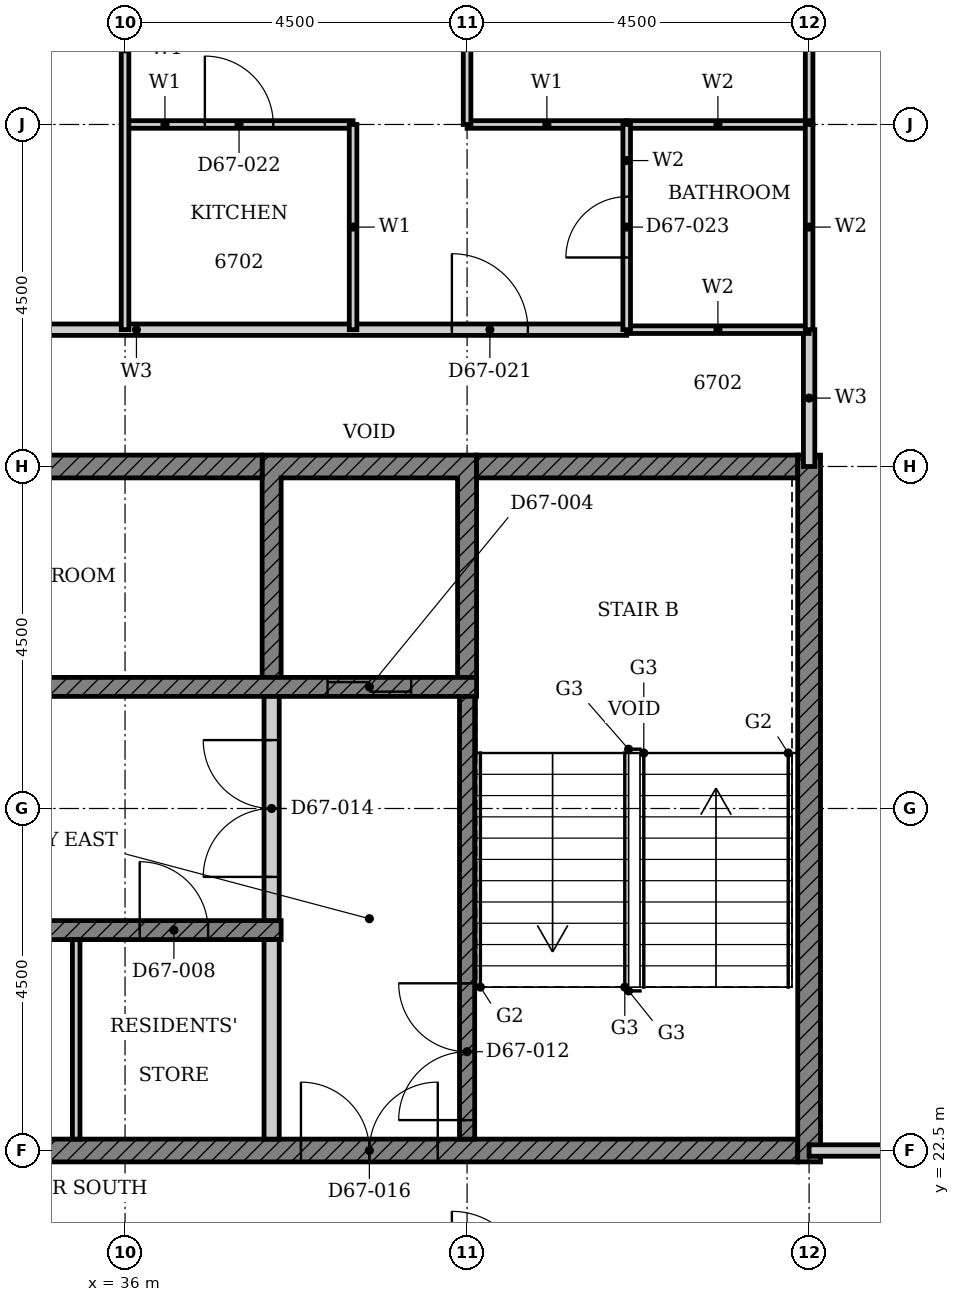
"""IFC4 building model, lengths in metres.
Left out: names, types, materials, properties, quantities, classifications, styles, units other than length and angle.
Written with IfcOpenShell. Run it as: python <this file> out.ifc"""

import sys

from ifc_helpers import new_model, si_unit, direction, frame, frame_2d, origin, place, context, subcontext, project, spatial, polyline, rectangle, outline, extrude, element, fill, save


model = new_model("IFC4")
c1 = context("Model", 3, precision=1e-05, world=origin(), true_north=direction((0.0, 1.0)))
c2 = subcontext(c1, "Body", "Model", "MODEL_VIEW")
j1 = project(units=[si_unit("LENGTHUNIT", "METRE"), si_unit("PLANEANGLEUNIT", "RADIAN")], contexts=[c1])
p1 = place(None, origin())
s1 = spatial("IfcSite", under=j1, at=p1, CompositionType="ELEMENT")
p2 = place(p1, origin())
s2 = spatial("IfcBuilding", under=s1, at=p2, CompositionType="ELEMENT")
p3 = place(p2, frame((0.0, 0.0, 263.8)))
s3 = spatial("IfcBuildingStorey", under=s2, at=p3, CompositionType="ELEMENT", Elevation=263.8)
p4 = place(p3, origin())
e1 = element("IfcWall", 1, at=p4, inside=s3, PredefinedType="SHEAR", context=c2, shape_type="SweptSolid", body=[
    extrude(outline(polyline([(37.803, 28.725), (38.053, 28.725), (38.053, 31.35), (40.375, 31.35), (40.375, 28.725), (40.625, 28.725), (40.625, 31.65), (37.803, 31.65), (37.803, 28.725)])), origin(), (0.0, 0.0, 1.0), 3.4),
])
p5 = place(p3, frame((30.339, 22.5, 0.0), z_axis=(0.0, 0.0, 1.0), x_axis=(1.0, 0.0, 0.0)))
e2 = element("IfcWall", 2, at=p5, inside=s3, PredefinedType="SHEAR", context=c2, shape_type="SweptSolid", body=[
    extrude(rectangle(XDim=14.511, YDim=0.3, at=frame_2d((7.255, 0.0))), origin(), (0.0, 0.0, 1.0), 3.4),
])
p6 = place(p5, frame((7.975, 0.0, 0.0)))
e3 = element("IfcOpeningElement", 3, at=p6, cuts=e2, PredefinedType="OPENING", context=c2, shape_type="SweptSolid", body=[
    extrude(rectangle(XDim=1.8, YDim=2.1, at=frame_2d((0.9, 1.05))), frame((0.0, 0.16, 0.0), z_axis=(0.0, -1.0, 0.0), x_axis=(1.0, 0.0, 0.0)), (0.0, 0.0, 1.0), 0.32),
])
p7 = place(p3, frame((30.339, 31.5, 0.0), z_axis=(0.0, 0.0, 1.0), x_axis=(1.0, 0.0, 0.0)))
e4 = element("IfcWall", 4, at=p7, inside=s3, PredefinedType="SHEAR", context=c2, shape_type="SweptSolid", body=[
    extrude(rectangle(XDim=7.464, YDim=0.3, at=frame_2d((3.732, 0.0))), origin(), (0.0, 0.0, 1.0), 3.4),
])
p8 = place(p3, frame((40.625, 31.5, 0.0), z_axis=(0.0, 0.0, 1.0), x_axis=(1.0, 0.0, 0.0)))
e5 = element("IfcWall", 5, at=p8, inside=s3, PredefinedType="SHEAR", context=c2, shape_type="SweptSolid", body=[
    extrude(rectangle(XDim=4.225, YDim=0.3, at=frame_2d((2.113, 0.0))), origin(), (0.0, 0.0, 1.0), 3.4),
])
p9 = place(p3, frame((45.0, 22.35, 0.0), z_axis=(0.0, 0.0, 1.0), x_axis=(0.0, 1.0, 0.0)))
e6 = element("IfcWall", 6, at=p9, inside=s3, PredefinedType="SHEAR", context=c2, shape_type="SweptSolid", body=[
    extrude(rectangle(XDim=9.3, YDim=0.3, at=frame_2d((4.65, 0.0))), origin(), (0.0, 0.0, 1.0), 3.4),
])
p10 = place(p3, frame((22.375, 25.4, 0.0), z_axis=(0.0, 0.0, 1.0), x_axis=(1.0, 0.0, 0.0)))
e7 = element("IfcWall", 7, at=p10, inside=s3, PredefinedType="SHEAR", context=c2, shape_type="SweptSolid", body=[
    extrude(rectangle(XDim=15.678, YDim=0.25, at=frame_2d((7.839, 0.0))), origin(), (0.0, 0.0, 1.0), 3.4),
])
p11 = place(p10, frame((6.004, 0.0, 0.0)))
e8 = element("IfcOpeningElement", 8, at=p11, cuts=e7, PredefinedType="OPENING", context=c2, shape_type="SweptSolid", body=[
    extrude(rectangle(XDim=1.1, YDim=2.1, at=frame_2d((0.55, 1.05))), frame((0.0, 0.135, 0.0), z_axis=(0.0, -1.0, 0.0), x_axis=(1.0, 0.0, 0.0)), (0.0, 0.0, 1.0), 0.27),
])
p12 = place(p10, frame((0.861, 0.0, 0.0)))
e9 = element("IfcOpeningElement", 9, at=p12, cuts=e7, PredefinedType="OPENING", context=c2, shape_type="SweptSolid", body=[
    extrude(rectangle(XDim=1.1, YDim=2.1, at=frame_2d((0.55, 1.05))), frame((0.0, 0.135, 0.0), z_axis=(0.0, -1.0, 0.0), x_axis=(1.0, 0.0, 0.0)), (0.0, 0.0, 1.0), 0.27),
])
p13 = place(p10, frame((3.532, 0.0, 0.0)))
e10 = element("IfcOpeningElement", 10, at=p13, cuts=e7, PredefinedType="OPENING", context=c2, shape_type="SweptSolid", body=[
    extrude(rectangle(XDim=0.9, YDim=2.1, at=frame_2d((0.45, 1.05))), frame((0.0, 0.135, 0.0), z_axis=(0.0, -1.0, 0.0), x_axis=(1.0, 0.0, 0.0)), (0.0, 0.0, 1.0), 0.27),
])
p14 = place(p10, frame((8.675, 0.0, 0.0)))
e11 = element("IfcOpeningElement", 11, at=p14, cuts=e7, PredefinedType="OPENING", context=c2, shape_type="SweptSolid", body=[
    extrude(rectangle(XDim=0.9, YDim=2.1, at=frame_2d((0.45, 1.05))), frame((0.0, 0.135, 0.0), z_axis=(0.0, -1.0, 0.0), x_axis=(1.0, 0.0, 0.0)), (0.0, 0.0, 1.0), 0.27),
])
p15 = place(p10, frame((11.246, 0.0, 0.0)))
e12 = element("IfcOpeningElement", 12, at=p15, cuts=e7, PredefinedType="OPENING", context=c2, shape_type="SweptSolid", body=[
    extrude(rectangle(XDim=0.9, YDim=2.1, at=frame_2d((0.45, 1.05))), frame((0.0, 0.135, 0.0), z_axis=(0.0, -1.0, 0.0), x_axis=(1.0, 0.0, 0.0)), (0.0, 0.0, 1.0), 0.27),
])
p16 = place(p10, frame((13.818, 0.0, 0.0)))
e13 = element("IfcOpeningElement", 13, at=p16, cuts=e7, PredefinedType="OPENING", context=c2, shape_type="SweptSolid", body=[
    extrude(rectangle(XDim=0.9, YDim=2.1, at=frame_2d((0.45, 1.05))), frame((0.0, 0.135, 0.0), z_axis=(0.0, -1.0, 0.0), x_axis=(1.0, 0.0, 0.0)), (0.0, 0.0, 1.0), 0.27),
])
p17 = place(p3, frame((24.947, 28.6, 0.0), z_axis=(0.0, 0.0, 1.0), x_axis=(1.0, 0.0, 0.0)))
e14 = element("IfcWall", 14, at=p17, inside=s3, PredefinedType="SHEAR", context=c2, shape_type="SweptSolid", body=[
    extrude(rectangle(XDim=15.678, YDim=0.25, at=frame_2d((7.839, 0.0))), origin(), (0.0, 0.0, 1.0), 3.4),
])
p18 = place(p17, frame((3.432, 0.0, 0.0)))
e15 = element("IfcOpeningElement", 15, at=p18, cuts=e14, PredefinedType="OPENING", context=c2, shape_type="SweptSolid", body=[
    extrude(rectangle(XDim=1.1, YDim=2.1, at=frame_2d((0.55, 1.05))), frame((0.0, 0.135, 0.0), z_axis=(0.0, -1.0, 0.0), x_axis=(1.0, 0.0, 0.0)), (0.0, 0.0, 1.0), 0.27),
])
p19 = place(p17, frame((13.718, 0.0, 0.0)))
e16 = element("IfcOpeningElement", 16, at=p19, cuts=e14, PredefinedType="OPENING", context=c2, shape_type="SweptSolid", body=[
    extrude(rectangle(XDim=1.1, YDim=2.1, at=frame_2d((0.55, 1.05))), frame((0.0, 0.135, 0.0), z_axis=(0.0, -1.0, 0.0), x_axis=(1.0, 0.0, 0.0)), (0.0, 0.0, 1.0), 0.27),
])
p20 = place(p17, frame((0.961, 0.0, 0.0)))
e17 = element("IfcOpeningElement", 17, at=p20, cuts=e14, PredefinedType="OPENING", context=c2, shape_type="SweptSolid", body=[
    extrude(rectangle(XDim=0.9, YDim=2.1, at=frame_2d((0.45, 1.05))), frame((0.0, 0.135, 0.0), z_axis=(0.0, -1.0, 0.0), x_axis=(1.0, 0.0, 0.0)), (0.0, 0.0, 1.0), 0.27),
])
p21 = place(p17, frame((8.675, 0.0, 0.0)))
e18 = element("IfcOpeningElement", 18, at=p21, cuts=e14, PredefinedType="OPENING", context=c2, shape_type="SweptSolid", body=[
    extrude(rectangle(XDim=0.9, YDim=2.1, at=frame_2d((0.45, 1.05))), frame((0.0, 0.135, 0.0), z_axis=(0.0, -1.0, 0.0), x_axis=(1.0, 0.0, 0.0)), (0.0, 0.0, 1.0), 0.27),
])
p22 = place(p3, frame((37.928, 22.65, 0.0), z_axis=(0.0, 0.0, 1.0), x_axis=(0.0, 1.0, 0.0)))
e19 = element("IfcWall", 19, at=p22, inside=s3, PredefinedType="PARTITIONING", context=c2, shape_type="SweptSolid", body=[
    extrude(rectangle(XDim=2.625, YDim=0.2, at=frame_2d((1.312, 0.0))), origin(), (0.0, 0.0, 1.0), 3.4),
])
p23 = place(p3, frame((35.357, 22.65, 0.0), z_axis=(0.0, 0.0, 1.0), x_axis=(0.0, 1.0, 0.0)))
e20 = element("IfcWall", 20, at=p23, inside=s3, PredefinedType="PARTITIONING", context=c2, shape_type="SweptSolid", body=[
    extrude(rectangle(XDim=2.625, YDim=0.1, at=frame_2d((1.312, 0.0))), origin(), (0.0, 0.0, 1.0), 3.4),
])
p24 = place(p3, frame((40.5, 22.65, 0.0), z_axis=(0.0, 0.0, 1.0), x_axis=(0.0, 1.0, 0.0)))
e21 = element("IfcWall", 21, at=p24, inside=s3, PredefinedType="SHEAR", context=c2, shape_type="SweptSolid", body=[
    extrude(rectangle(XDim=5.825, YDim=0.2, at=frame_2d((2.913, 0.0))), origin(), (0.0, 0.0, 1.0), 3.4),
])
p25 = place(p24, frame((0.25, 0.0, 0.0)))
e22 = element("IfcOpeningElement", 22, at=p25, cuts=e21, PredefinedType="OPENING", context=c2, shape_type="SweptSolid", body=[
    extrude(rectangle(XDim=1.8, YDim=2.1, at=frame_2d((0.9, 1.05))), frame((0.0, 0.11, 0.0), z_axis=(0.0, -1.0, 0.0), x_axis=(1.0, 0.0, 0.0)), (0.0, 0.0, 1.0), 0.22),
])
p26 = place(p3, frame((37.928, 25.525, 0.0), z_axis=(0.0, 0.0, 1.0), x_axis=(0.0, 1.0, 0.0)))
e23 = element("IfcWall", 23, at=p26, inside=s3, PredefinedType="PARTITIONING", context=c2, shape_type="SweptSolid", body=[
    extrude(rectangle(XDim=2.95, YDim=0.2, at=frame_2d((1.475, 0.0))), origin(), (0.0, 0.0, 1.0), 3.4),
])
p27 = place(p26, frame((0.575, 0.0, 0.0)))
e24 = element("IfcOpeningElement", 24, at=p27, cuts=e23, PredefinedType="OPENING", context=c2, shape_type="SweptSolid", body=[
    extrude(rectangle(XDim=1.8, YDim=2.1, at=frame_2d((0.9, 1.05))), frame((0.0, 0.11, 0.0), z_axis=(0.0, -1.0, 0.0), x_axis=(1.0, 0.0, 0.0)), (0.0, 0.0, 1.0), 0.22),
])
p28 = place(p3, frame((45.0, 22.5, 0.0), z_axis=(0.0, 0.0, 1.0), x_axis=(1.0, 0.0, 0.0)))
e25 = element("IfcWall", 25, at=p28, inside=s3, PredefinedType="PARTITIONING", context=c2, shape_type="SweptSolid", body=[
    extrude(rectangle(XDim=4.74, YDim=0.15, at=frame_2d((2.37, 0.0))), origin(), (0.0, 0.0, 1.0), 3.4),
])
p29 = place(p28, frame((1.75, 0.0, 0.0)))
e26 = element("IfcOpeningElement", 26, at=p29, cuts=e25, PredefinedType="OPENING", context=c2, shape_type="SweptSolid", body=[
    extrude(rectangle(XDim=1.0, YDim=2.1, at=frame_2d((0.5, 1.05))), frame((0.0, 0.085, 0.0), z_axis=(0.0, -1.0, 0.0), x_axis=(1.0, 0.0, 0.0)), (0.0, 0.0, 1.0), 0.17),
])
p30 = place(p3, frame((20.4, 33.3, 0.0), z_axis=(0.0, 0.0, 1.0), x_axis=(1.0, 0.0, 0.0)))
e27 = element("IfcWall", 27, at=p30, inside=s3, PredefinedType="PARTITIONING", context=c2, shape_type="SweptSolid", body=[
    extrude(rectangle(XDim=22.2, YDim=0.15, at=frame_2d((11.1, 0.0))), origin(), (0.0, 0.0, 1.0), 3.4),
])
p31 = place(p30, frame((1.3, 0.0, 0.0)))
e28 = element("IfcOpeningElement", 28, at=p31, cuts=e27, PredefinedType="OPENING", context=c2, shape_type="SweptSolid", body=[
    extrude(rectangle(XDim=1.0, YDim=2.2, at=frame_2d((0.5, 1.1))), frame((0.0, 0.085, 0.0), z_axis=(0.0, -1.0, 0.0), x_axis=(1.0, 0.0, 0.0)), (0.0, 0.0, 1.0), 0.17),
])
p32 = place(p30, frame((10.6, 0.0, 0.0)))
e29 = element("IfcOpeningElement", 29, at=p32, cuts=e27, PredefinedType="OPENING", context=c2, shape_type="SweptSolid", body=[
    extrude(rectangle(XDim=1.0, YDim=2.1, at=frame_2d((0.5, 1.05))), frame((0.0, 0.085, 0.0), z_axis=(0.0, -1.0, 0.0), x_axis=(1.0, 0.0, 0.0)), (0.0, 0.0, 1.0), 0.17),
])
p33 = place(p30, frame((19.9, 0.0, 0.0)))
e30 = element("IfcOpeningElement", 30, at=p33, cuts=e27, PredefinedType="OPENING", context=c2, shape_type="SweptSolid", body=[
    extrude(rectangle(XDim=1.0, YDim=2.2, at=frame_2d((0.5, 1.1))), frame((0.0, 0.085, 0.0), z_axis=(0.0, -1.0, 0.0), x_axis=(1.0, 0.0, 0.0)), (0.0, 0.0, 1.0), 0.17),
])
p34 = place(p3, frame((45.0, 31.5, 0.0), z_axis=(0.0, 0.0, 1.0), x_axis=(0.0, 1.0, 0.0)))
e31 = element("IfcWall", 31, at=p34, inside=s3, PredefinedType="PARTITIONING", context=c2, shape_type="SweptSolid", body=[
    extrude(rectangle(XDim=1.8, YDim=0.15, at=frame_2d((0.9, 0.0))), origin(), (0.0, 0.0, 1.0), 3.4),
])
p35 = place(p3, frame((40.5, 36.0, 0.0), z_axis=(0.0, 0.0, 1.0), x_axis=(1.0, 0.0, 0.0)))
e32 = element("IfcWall", 32, at=p35, inside=s3, PredefinedType="PARTITIONING", context=c2, shape_type="SweptSolid", body=[
    extrude(rectangle(XDim=2.1, YDim=0.1, at=frame_2d((1.05, 0.0))), origin(), (0.0, 0.0, 1.0), 3.4),
])
p36 = place(p3, frame((36.0, 36.0, 0.0), z_axis=(0.0, 0.0, 1.0), x_axis=(1.0, 0.0, 0.0)))
e33 = element("IfcWall", 33, at=p36, inside=s3, PredefinedType="PARTITIONING", context=c2, shape_type="SweptSolid", body=[
    extrude(rectangle(XDim=3.0, YDim=0.1, at=frame_2d((1.5, 0.0))), origin(), (0.0, 0.0, 1.0), 3.4),
])
p37 = place(p36, frame((1.05, 0.0, 0.0)))
e34 = element("IfcOpeningElement", 34, at=p37, cuts=e33, PredefinedType="OPENING", context=c2, shape_type="SweptSolid", body=[
    extrude(rectangle(XDim=0.9, YDim=2.1, at=frame_2d((0.45, 1.05))), frame((0.0, 0.06, 0.0), z_axis=(0.0, -1.0, 0.0), x_axis=(1.0, 0.0, 0.0)), (0.0, 0.0, 1.0), 0.12),
])
p38 = place(p3, frame((36.0, 33.3, 0.0), z_axis=(0.0, 0.0, 1.0), x_axis=(0.0, 1.0, 0.0)))
e35 = element("IfcWall", 35, at=p38, inside=s3, PredefinedType="PARTITIONING", context=c2, shape_type="SweptSolid", body=[
    extrude(rectangle(XDim=7.39, YDim=0.1, at=frame_2d((3.695, 0.0))), origin(), (0.0, 0.0, 1.0), 3.4),
])
p39 = place(p3, frame((39.0, 33.3, 0.0), z_axis=(0.0, 0.0, 1.0), x_axis=(0.0, 1.0, 0.0)))
e36 = element("IfcWall", 36, at=p39, inside=s3, PredefinedType="PARTITIONING", context=c2, shape_type="SweptSolid", body=[
    extrude(rectangle(XDim=2.7, YDim=0.1, at=frame_2d((1.35, 0.0))), origin(), (0.0, 0.0, 1.0), 3.4),
])
p40 = place(p3, frame((40.5, 36.0, 0.0), z_axis=(0.0, 0.0, 1.0), x_axis=(0.0, 1.0, 0.0)))
e37 = element("IfcWall", 37, at=p40, inside=s3, PredefinedType="PARTITIONING", context=c2, shape_type="SweptSolid", body=[
    extrude(rectangle(XDim=4.74, YDim=0.1, at=frame_2d((2.37, 0.0))), origin(), (0.0, 0.0, 1.0), 3.4),
])
p41 = place(p40, frame((1.8, 0.0, 0.0)))
e38 = element("IfcOpeningElement", 38, at=p41, cuts=e37, PredefinedType="OPENING", context=c2, shape_type="SweptSolid", body=[
    extrude(rectangle(XDim=0.9, YDim=2.1, at=frame_2d((0.45, 1.05))), frame((0.0, 0.06, 0.0), z_axis=(0.0, -1.0, 0.0), x_axis=(1.0, 0.0, 0.0)), (0.0, 0.0, 1.0), 0.12),
])
p42 = place(p3, frame((45.0, 36.0, 0.0), z_axis=(0.0, 0.0, 1.0), x_axis=(0.0, 1.0, 0.0)))
e39 = element("IfcWall", 39, at=p42, inside=s3, PredefinedType="PARTITIONING", context=c2, shape_type="SweptSolid", body=[
    extrude(rectangle(XDim=2.2, YDim=0.1, at=frame_2d((1.1, 0.0))), origin(), (0.0, 0.0, 1.0), 3.4),
])
for number, where, z_axis, x_axis in (
    (40, (42.6, 33.3, 0.0), (0.0, 0.0, 1.0), (1.0, 0.0, 0.0)),
    (41, (42.6, 36.0, 0.0), (0.0, 0.0, 1.0), (1.0, 0.0, 0.0)),
):
    element("IfcWall", number, at=place(p3, frame(where, z_axis=z_axis, x_axis=x_axis)), inside=s3, PredefinedType="PARTITIONING", context=c2, shape_type="SweptSolid", body=[
        extrude(rectangle(XDim=2.4, YDim=0.1, at=frame_2d((1.2, 0.0))), origin(), (0.0, 0.0, 1.0), 3.4),
    ])
p43 = place(p3, frame((42.6, 33.3, 0.0), z_axis=(0.0, 0.0, 1.0), x_axis=(0.0, 1.0, 0.0)))
e42 = element("IfcWall", 42, at=p43, inside=s3, PredefinedType="PARTITIONING", context=c2, shape_type="SweptSolid", body=[
    extrude(rectangle(XDim=2.7, YDim=0.1, at=frame_2d((1.35, 0.0))), origin(), (0.0, 0.0, 1.0), 3.4),
])
p44 = place(p43, frame((0.95, 0.0, 0.0)))
e43 = element("IfcOpeningElement", 43, at=p44, cuts=e42, PredefinedType="OPENING", context=c2, shape_type="SweptSolid", body=[
    extrude(rectangle(XDim=0.8, YDim=2.1, at=frame_2d((0.4, 1.05))), frame((0.0, 0.06, 0.0), z_axis=(0.0, -1.0, 0.0), x_axis=(1.0, 0.0, 0.0)), (0.0, 0.0, 1.0), 0.12),
])
p45 = place(p3, frame((45.0, 33.3, 0.0), z_axis=(0.0, 0.0, 1.0), x_axis=(0.0, 1.0, 0.0)))
e44 = element("IfcWall", 44, at=p45, inside=s3, PredefinedType="PARTITIONING", context=c2, shape_type="SweptSolid", body=[
    extrude(rectangle(XDim=2.7, YDim=0.1, at=frame_2d((1.35, 0.0))), origin(), (0.0, 0.0, 1.0), 3.4),
])
p46 = place(p19, origin())
e45 = element("IfcDoor", 45, at=p46, inside=s3, OperationType="DOUBLE_DOOR_SLIDING", PredefinedType="DOOR", context=c2, shape_type="SweptSolid", body=[
    extrude(rectangle(XDim=1.1, YDim=2.1, at=frame_2d((0.55, 1.05))), frame((0.0, 0.025, 0.0), z_axis=(0.0, -1.0, 0.0), x_axis=(1.0, 0.0, 0.0)), (0.0, 0.0, 1.0), 0.05),
])
fill(e16, e45)
p47 = place(p16, origin())
e46 = element("IfcDoor", 46, at=p47, inside=s3, OperationType="SINGLE_SWING_LEFT", PredefinedType="DOOR", context=c2, shape_type="SweptSolid", body=[
    extrude(rectangle(XDim=0.9, YDim=2.1, at=frame_2d((0.45, 1.05))), frame((0.0, 0.025, 0.0), z_axis=(0.0, -1.0, 0.0), x_axis=(1.0, 0.0, 0.0)), (0.0, 0.0, 1.0), 0.05),
])
fill(e13, e46)
p48 = place(p25, origin())
e47 = element("IfcDoor", 47, at=p48, inside=s3, OperationType="DOUBLE_DOOR_SINGLE_SWING", PredefinedType="DOOR", context=c2, shape_type="SweptSolid", body=[
    extrude(rectangle(XDim=1.8, YDim=2.1, at=frame_2d((0.9, 1.05))), frame((0.0, 0.025, 0.0), z_axis=(0.0, -1.0, 0.0), x_axis=(1.0, 0.0, 0.0)), (0.0, 0.0, 1.0), 0.05),
])
fill(e22, e47)
p49 = place(p27, origin())
e48 = element("IfcDoor", 48, at=p49, inside=s3, OperationType="DOUBLE_DOOR_SINGLE_SWING", PredefinedType="DOOR", context=c2, shape_type="SweptSolid", body=[
    extrude(rectangle(XDim=1.8, YDim=2.1, at=frame_2d((0.9, 1.05))), frame((0.0, 0.025, 0.0), z_axis=(0.0, -1.0, 0.0), x_axis=(1.0, 0.0, 0.0)), (0.0, 0.0, 1.0), 0.05),
])
fill(e24, e48)
p50 = place(p6, origin())
e49 = element("IfcDoor", 49, at=p50, inside=s3, OperationType="DOUBLE_DOOR_SINGLE_SWING", PredefinedType="DOOR", context=c2, shape_type="SweptSolid", body=[
    extrude(rectangle(XDim=1.8, YDim=2.1, at=frame_2d((0.9, 1.05))), frame((0.0, 0.025, 0.0), z_axis=(0.0, -1.0, 0.0), x_axis=(1.0, 0.0, 0.0)), (0.0, 0.0, 1.0), 0.05),
])
fill(e3, e49)
p51 = place(p33, origin())
e50 = element("IfcDoor", 50, at=p51, inside=s3, OperationType="SINGLE_SWING_RIGHT", PredefinedType="DOOR", context=c2, shape_type="SweptSolid", body=[
    extrude(rectangle(XDim=1.0, YDim=2.2, at=frame_2d((0.5, 1.1))), frame((0.0, 0.025, 0.0), z_axis=(0.0, -1.0, 0.0), x_axis=(1.0, 0.0, 0.0)), (0.0, 0.0, 1.0), 0.05),
])
fill(e30, e50)
p52 = place(p37, origin())
e51 = element("IfcDoor", 51, at=p52, inside=s3, OperationType="SINGLE_SWING_LEFT", PredefinedType="DOOR", context=c2, shape_type="SweptSolid", body=[
    extrude(rectangle(XDim=0.9, YDim=2.1, at=frame_2d((0.45, 1.05))), frame((0.0, 0.025, 0.0), z_axis=(0.0, -1.0, 0.0), x_axis=(1.0, 0.0, 0.0)), (0.0, 0.0, 1.0), 0.05),
])
fill(e34, e51)
p53 = place(p44, origin())
e52 = element("IfcDoor", 52, at=p53, inside=s3, OperationType="SINGLE_SWING_LEFT", PredefinedType="DOOR", context=c2, shape_type="SweptSolid", body=[
    extrude(rectangle(XDim=0.8, YDim=2.1, at=frame_2d((0.4, 1.05))), frame((0.0, 0.025, 0.0), z_axis=(0.0, -1.0, 0.0), x_axis=(1.0, 0.0, 0.0)), (0.0, 0.0, 1.0), 0.05),
])
fill(e43, e52)
save(model, sys.argv[1])
